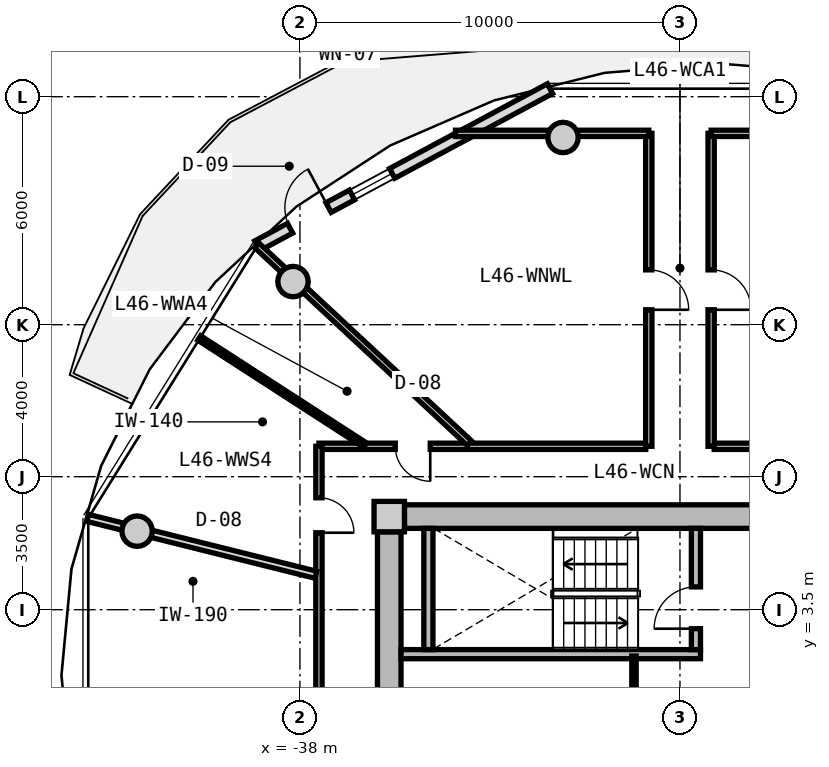
"""IFC4 building model, lengths in metres.
Left out: names, types, materials, properties, quantities, classifications, styles, units other than length and angle.
Written with IfcOpenShell. Run it as: python <this file> out.ifc"""

import sys

from ifc_helpers import new_model, si_unit, direction, frame, frame_2d, origin, origin_2d, place, context, subcontext, project, spatial, rectangle, circle, extrude, source, transform, mapped, element, fill, save


model = new_model("IFC4")
c1 = context("Model", 3, precision=1e-05, world=origin(), true_north=direction((0.0, 1.0)))
c2 = subcontext(c1, "Body", "Model", "MODEL_VIEW")
j1 = project(units=[si_unit("LENGTHUNIT", "METRE"), si_unit("PLANEANGLEUNIT", "RADIAN")], contexts=[c1])
p1 = place(None, origin())
s1 = spatial("IfcSite", under=j1, at=p1, CompositionType="ELEMENT")
p2 = place(p1, origin())
s2 = spatial("IfcBuilding", under=s1, at=p2, CompositionType="ELEMENT")
p3 = place(p2, frame((0.0, 0.0, 149.55)))
s3 = spatial("IfcBuildingStorey", under=s2, at=p3, CompositionType="ELEMENT", Elevation=149.55)
m1 = source(origin(), c2, "Body", "SweptSolid", [
    extrude(rectangle(XDim=0.8, YDim=0.8, at=origin_2d()), origin(), (0.0, 0.0, 1.0), 3.05),
])
p4 = place(p3, frame((-35.65, 5.95, 0.0), z_axis=(0.0, 0.0, 1.0), x_axis=(1.0, 0.0, 0.0)))
e1 = element("IfcColumn", 1, at=p4, inside=s3, PredefinedType="COLUMN", context=c2, shape_type="MappedRepresentation", body=[
    mapped(m1, transform((0.0, 0.0, 0.0), x_axis=(1.0, 0.0, 0.0), y_axis=(0.0, 1.0, 0.0), z_axis=(0.0, 0.0, 1.0), scale=1.0)),
])
m2 = source(origin(), c2, "Body", "SweptSolid", [
    extrude(rectangle(XDim=14.5, YDim=0.62, at=frame_2d((7.25, 0.0))), origin(), (0.0, 0.0, 1.0), 2.81),
])
p5 = place(p3, frame((-35.25, 5.95, 0.0), z_axis=(0.0, 0.0, 1.0), x_axis=(1.0, 0.0, 0.0)))
e2 = element("IfcWall", 2, at=p5, inside=s3, PredefinedType="SHEAR", context=c2, shape_type="MappedRepresentation", body=[
    mapped(m2, transform((0.0, 0.0, 0.0), x_axis=(1.0, 0.0, 0.0), y_axis=(0.0, 1.0, 0.0), z_axis=(0.0, 0.0, 1.0), scale=1.0)),
])
m3 = source(origin(), c2, "Body", "SweptSolid", [
    extrude(rectangle(XDim=11.1, YDim=0.62, at=frame_2d((5.55, 0.0))), origin(), (0.0, 0.0, 1.0), 2.81),
])
p6 = place(p3, frame((-35.65, -5.55, 0.0), z_axis=(0.0, 0.0, 1.0), x_axis=(0.0, 1.0, 0.0)))
e3 = element("IfcWall", 3, at=p6, inside=s3, PredefinedType="SHEAR", context=c2, shape_type="MappedRepresentation", body=[
    mapped(m3, transform((0.0, 0.0, 0.0), x_axis=(1.0, 0.0, 0.0), y_axis=(0.0, 1.0, 0.0), z_axis=(0.0, 0.0, 1.0), scale=1.0)),
])
p7 = place(p6, frame((3.8, 0.0, 0.0)))
e4 = element("IfcOpeningElement", 4, at=p7, cuts=e3, PredefinedType="OPENING", context=c2, shape_type="SweptSolid", body=[
    extrude(rectangle(XDim=1.2, YDim=2.15, at=frame_2d((0.6, 1.075))), frame((0.0, 0.32, 0.0), z_axis=(0.0, -1.0, 0.0), x_axis=(1.0, 0.0, 0.0)), (0.0, 0.0, 1.0), 0.64),
])
m4 = source(origin(), c2, "Body", "SweptSolid", [
    extrude(circle(Radius=0.4, at=origin_2d()), origin(), (0.0, 0.0, 1.0), 3.05),
])
for number, where, z_axis, x_axis in (
    (5, (-31.077, 15.926, 0.0), (0.0, 0.0, 1.0), (1.0, 0.0, 0.0)),
    (6, (-38.183, 12.135, 0.0), (0.0, 0.0, 1.0), (1.0, 0.0, 0.0)),
    (7, (-42.285, 5.567, 0.0), (0.0, 0.0, 1.0), (1.0, 0.0, 0.0)),
):
    element("IfcColumn", number, at=place(p3, frame(where, z_axis=z_axis, x_axis=x_axis)), inside=s3, PredefinedType="COLUMN", context=c2, shape_type="MappedRepresentation", body=[
        mapped(m4, transform((0.0, 0.0, 0.0), x_axis=(1.0, 0.0, 0.0), y_axis=(0.0, 1.0, 0.0), z_axis=(0.0, 0.0, 1.0), scale=1.0)),
    ])
m5 = source(origin(), c2, "Body", "SweptSolid", [
    extrude(rectangle(XDim=8.742, YDim=0.29, at=frame_2d((4.371, 0.0))), origin(), (0.0, 0.0, 1.0), 2.81),
])
p8 = place(p3, frame((-39.123, 13.075, 0.0), z_axis=(0.0, 0.0, 1.0), x_axis=(0.880992489116, 0.473130250693, 0.0)))
e8 = element("IfcWall", 8, at=p8, inside=s3, PredefinedType="SOLIDWALL", context=c2, shape_type="MappedRepresentation", body=[
    mapped(m5, transform((0.0, 0.0, 0.0), x_axis=(1.0, 0.0, 0.0), y_axis=(0.0, 1.0, 0.0), z_axis=(0.0, 0.0, 1.0), scale=1.0)),
])
p9 = place(p8, frame((0.98, 0.0, 0.0)))
e9 = element("IfcOpeningElement", 9, at=p9, cuts=e8, PredefinedType="OPENING", context=c2, shape_type="SweptSolid", body=[
    extrude(rectangle(XDim=1.15, YDim=2.25, at=frame_2d((0.575, 1.125))), frame((0.0, 0.155, 0.0), z_axis=(0.0, -1.0, 0.0), x_axis=(1.0, 0.0, 0.0)), (0.0, 0.0, 1.0), 0.31),
])
p10 = place(p8, frame((2.83, 0.0, 0.85)))
e10 = element("IfcOpeningElement", 10, at=p10, cuts=e8, PredefinedType="OPENING", context=c2, shape_type="SweptSolid", body=[
    extrude(rectangle(XDim=1.2, YDim=1.5, at=frame_2d((0.6, 0.75))), frame((0.0, 0.155, 0.0), z_axis=(0.0, -1.0, 0.0), x_axis=(1.0, 0.0, 0.0)), (0.0, 0.0, 1.0), 0.31),
])
m6 = source(origin(), c2, "Body", "SweptSolid", [
    extrude(rectangle(XDim=7.88, YDim=0.24, at=frame_2d((3.94, 0.0))), origin(), (0.0, 0.0, 1.0), 2.81),
])
p11 = place(p3, frame((-35.34, 2.33, 0.0), z_axis=(0.0, 0.0, 1.0), x_axis=(1.0, 0.0, 0.0)))
e11 = element("IfcWall", 11, at=p11, inside=s3, PredefinedType="PARTITIONING", context=c2, shape_type="MappedRepresentation", body=[
    mapped(m6, transform((0.0, 0.0, 0.0), x_axis=(1.0, 0.0, 0.0), y_axis=(0.0, 1.0, 0.0), z_axis=(0.0, 0.0, 1.0), scale=1.0)),
])
m7 = source(origin(), c2, "Body", "SweptSolid", [
    extrude(rectangle(XDim=3.19, YDim=0.24, at=frame_2d((1.595, 0.0))), origin(), (0.0, 0.0, 1.0), 2.81),
])
p12 = place(p3, frame((-34.62, 2.45, 0.0), z_axis=(0.0, 0.0, 1.0), x_axis=(0.0, 1.0, 0.0)))
e12 = element("IfcWall", 12, at=p12, inside=s3, PredefinedType="PARTITIONING", context=c2, shape_type="MappedRepresentation", body=[
    mapped(m7, transform((0.0, 0.0, 0.0), x_axis=(1.0, 0.0, 0.0), y_axis=(0.0, 1.0, 0.0), z_axis=(0.0, 0.0, 1.0), scale=1.0)),
])
p13 = place(p3, frame((-27.58, 2.45, 0.0), z_axis=(0.0, 0.0, 1.0), x_axis=(0.0, 1.0, 0.0)))
e13 = element("IfcWall", 13, at=p13, inside=s3, PredefinedType="PARTITIONING", context=c2, shape_type="MappedRepresentation", body=[
    mapped(m7, transform((0.0, 0.0, 0.0), x_axis=(1.0, 0.0, 0.0), y_axis=(0.0, 1.0, 0.0), z_axis=(0.0, 0.0, 1.0), scale=1.0)),
])
p14 = place(p13, frame((0.55, 0.0, 0.0)))
e14 = element("IfcOpeningElement", 14, at=p14, cuts=e13, PredefinedType="OPENING", context=c2, shape_type="SweptSolid", body=[
    extrude(rectangle(XDim=1.1, YDim=2.15, at=frame_2d((0.55, 1.075))), frame((0.0, 0.13, 0.0), z_axis=(0.0, -1.0, 0.0), x_axis=(1.0, 0.0, 0.0)), (0.0, 0.0, 1.0), 0.26),
])
m8 = source(origin(), c2, "Body", "SweptSolid", [
    extrude(rectangle(XDim=2.33, YDim=0.115, at=frame_2d((1.165, 0.0))), origin(), (0.0, 0.0, 1.0), 2.795),
])
p15 = place(p3, frame((-29.21, -0.05, 0.0), z_axis=(0.0, 0.0, 1.0), x_axis=(0.0, 1.0, 0.0)))
e15 = element("IfcWall", 15, at=p15, inside=s3, PredefinedType="PARTITIONING", context=c2, shape_type="MappedRepresentation", body=[
    mapped(m8, transform((0.0, 0.0, 0.0), x_axis=(1.0, 0.0, 0.0), y_axis=(0.0, 1.0, 0.0), z_axis=(0.0, 0.0, 1.0), scale=1.0)),
])
m9 = source(origin(), c2, "Body", "SweptSolid", [
    extrude(rectangle(XDim=8.6, YDim=0.165, at=frame_2d((4.3, 0.0))), origin(), (0.0, 0.0, 1.0), 2.795),
])
p16 = place(p3, frame((-37.5, 7.8, 0.0), z_axis=(0.0, 0.0, 1.0), x_axis=(1.0, 0.0, 0.0)))
e16 = element("IfcWall", 16, at=p16, inside=s3, PredefinedType="PARTITIONING", context=c2, shape_type="MappedRepresentation", body=[
    mapped(m9, transform((0.0, 0.0, 0.0), x_axis=(1.0, 0.0, 0.0), y_axis=(0.0, 1.0, 0.0), z_axis=(0.0, 0.0, 1.0), scale=1.0)),
])
p17 = place(p16, frame((2.009, 0.0, 0.0)))
e17 = element("IfcOpeningElement", 17, at=p17, cuts=e16, PredefinedType="OPENING", context=c2, shape_type="SweptSolid", body=[
    extrude(rectangle(XDim=0.92, YDim=2.1, at=frame_2d((0.46, 1.05))), frame((0.0, 0.093, 0.0), z_axis=(0.0, -1.0, 0.0), x_axis=(1.0, 0.0, 0.0)), (0.0, 0.0, 1.0), 0.185),
])
p18 = place(p3, frame((-27.1, 7.8, 0.0), z_axis=(0.0, 0.0, 1.0), x_axis=(1.0, 0.0, 0.0)))
e18 = element("IfcWall", 18, at=p18, inside=s3, PredefinedType="PARTITIONING", context=c2, shape_type="MappedRepresentation", body=[
    mapped(m9, transform((0.0, 0.0, 0.0), x_axis=(1.0, 0.0, 0.0), y_axis=(0.0, 1.0, 0.0), z_axis=(0.0, 0.0, 1.0), scale=1.0)),
])
p19 = place(p18, frame((6.96, 0.0, 0.0)))
e19 = element("IfcOpeningElement", 19, at=p19, cuts=e18, PredefinedType="OPENING", context=c2, shape_type="SweptSolid", body=[
    extrude(rectangle(XDim=1.05, YDim=2.15, at=frame_2d((0.525, 1.075))), frame((0.0, 0.093, 0.0), z_axis=(0.0, -1.0, 0.0), x_axis=(1.0, 0.0, 0.0)), (0.0, 0.0, 1.0), 0.185),
])
p20 = place(p18, frame((3.904, 0.0, 0.0)))
e20 = element("IfcOpeningElement", 20, at=p20, cuts=e18, PredefinedType="OPENING", context=c2, shape_type="SweptSolid", body=[
    extrude(rectangle(XDim=1.05, YDim=2.15, at=frame_2d((0.525, 1.075))), frame((0.0, 0.093, 0.0), z_axis=(0.0, -1.0, 0.0), x_axis=(1.0, 0.0, 0.0)), (0.0, 0.0, 1.0), 0.185),
])
p21 = place(p18, frame((2.347, 0.0, 0.0)))
e21 = element("IfcOpeningElement", 21, at=p21, cuts=e18, PredefinedType="OPENING", context=c2, shape_type="SweptSolid", body=[
    extrude(rectangle(XDim=1.05, YDim=2.15, at=frame_2d((0.525, 1.075))), frame((0.0, 0.093, 0.0), z_axis=(0.0, -1.0, 0.0), x_axis=(1.0, 0.0, 0.0)), (0.0, 0.0, 1.0), 0.185),
])
m10 = source(origin(), c2, "Body", "SweptSolid", [
    extrude(rectangle(XDim=15.6, YDim=0.165, at=frame_2d((7.8, 0.0))), origin(), (0.0, 0.0, 1.0), 2.795),
])
p22 = place(p3, frame((-37.5, -7.8, 0.0), z_axis=(0.0, 0.0, 1.0), x_axis=(0.0, 1.0, 0.0)))
e22 = element("IfcWall", 22, at=p22, inside=s3, PredefinedType="PARTITIONING", context=c2, shape_type="MappedRepresentation", body=[
    mapped(m10, transform((0.0, 0.0, 0.0), x_axis=(1.0, 0.0, 0.0), y_axis=(0.0, 1.0, 0.0), z_axis=(0.0, 0.0, 1.0), scale=1.0)),
])
p23 = place(p22, frame((13.325, 0.0, 0.0)))
e23 = element("IfcOpeningElement", 23, at=p23, cuts=e22, PredefinedType="OPENING", context=c2, shape_type="SweptSolid", body=[
    extrude(rectangle(XDim=0.92, YDim=2.1, at=frame_2d((0.46, 1.05))), frame((0.0, 0.093, 0.0), z_axis=(0.0, -1.0, 0.0), x_axis=(1.0, 0.0, 0.0)), (0.0, 0.0, 1.0), 0.185),
])
p24 = place(p22, frame((5.628, 0.0, 0.0)))
e24 = element("IfcOpeningElement", 24, at=p24, cuts=e22, PredefinedType="OPENING", context=c2, shape_type="SweptSolid", body=[
    extrude(rectangle(XDim=1.25, YDim=2.2, at=frame_2d((0.625, 1.1))), frame((0.0, 0.093, 0.0), z_axis=(0.0, -1.0, 0.0), x_axis=(1.0, 0.0, 0.0)), (0.0, 0.0, 1.0), 0.185),
])
m11 = source(origin(), c2, "Body", "SweptSolid", [
    extrude(rectangle(XDim=7.648, YDim=0.165, at=frame_2d((3.824, 0.0))), origin(), (0.0, 0.0, 1.0), 2.345),
])
p25 = place(p3, frame((-33.538, 7.88, 0.0), z_axis=(0.0, 0.0, 1.0), x_axis=(-0.732167856666, 0.681124239522, 0.0)))
e25 = element("IfcWall", 25, at=p25, inside=s3, PredefinedType="PARTITIONING", context=c2, shape_type="MappedRepresentation", body=[
    mapped(m11, transform((0.0, 0.0, 0.0), x_axis=(1.0, 0.0, 0.0), y_axis=(0.0, 1.0, 0.0), z_axis=(0.0, 0.0, 1.0), scale=1.0)),
])
m12 = source(origin(), c2, "Body", "SweptSolid", [
    extrude(rectangle(XDim=8.235, YDim=0.165, at=frame_2d((4.118, 0.0))), origin(), (0.0, 0.0, 1.0), 2.795),
])
p26 = place(p3, frame((-28.82, 7.8, 0.0), z_axis=(0.0, 0.0, 1.0), x_axis=(0.0, 1.0, 0.0)))
e26 = element("IfcWall", 26, at=p26, inside=s3, PredefinedType="PARTITIONING", context=c2, shape_type="MappedRepresentation", body=[
    mapped(m12, transform((0.0, 0.0, 0.0), x_axis=(1.0, 0.0, 0.0), y_axis=(0.0, 1.0, 0.0), z_axis=(0.0, 0.0, 1.0), scale=1.0)),
])
p27 = place(p26, frame((3.593, 0.0, 0.0)))
e27 = element("IfcOpeningElement", 27, at=p27, cuts=e26, PredefinedType="OPENING", context=c2, shape_type="SweptSolid", body=[
    extrude(rectangle(XDim=1.05, YDim=2.15, at=frame_2d((0.525, 1.075))), frame((0.0, 0.093, 0.0), z_axis=(0.0, -1.0, 0.0), x_axis=(1.0, 0.0, 0.0)), (0.0, 0.0, 1.0), 0.185),
])
m13 = source(origin(), c2, "Body", "SweptSolid", [
    extrude(rectangle(XDim=5.089, YDim=0.165, at=frame_2d((2.544, 0.0))), origin(), (0.0, 0.0, 1.0), 2.345),
])
p28 = place(p3, frame((-33.909, 16.035, 0.0), z_axis=(0.0, 0.0, 1.0), x_axis=(1.0, 0.0, 0.0)))
e28 = element("IfcWall", 28, at=p28, inside=s3, PredefinedType="PARTITIONING", context=c2, shape_type="MappedRepresentation", body=[
    mapped(m13, transform((0.0, 0.0, 0.0), x_axis=(1.0, 0.0, 0.0), y_axis=(0.0, 1.0, 0.0), z_axis=(0.0, 0.0, 1.0), scale=1.0)),
])
p29 = place(p3, frame((-27.18, 7.8, 0.0), z_axis=(0.0, 0.0, 1.0), x_axis=(0.0, 1.0, 0.0)))
e29 = element("IfcWall", 29, at=p29, inside=s3, PredefinedType="PARTITIONING", context=c2, shape_type="MappedRepresentation", body=[
    mapped(m12, transform((0.0, 0.0, 0.0), x_axis=(1.0, 0.0, 0.0), y_axis=(0.0, 1.0, 0.0), z_axis=(0.0, 0.0, 1.0), scale=1.0)),
])
p30 = place(p29, frame((3.593, 0.0, 0.0)))
e30 = element("IfcOpeningElement", 30, at=p30, cuts=e29, PredefinedType="OPENING", context=c2, shape_type="SweptSolid", body=[
    extrude(rectangle(XDim=1.05, YDim=2.15, at=frame_2d((0.525, 1.075))), frame((0.0, 0.093, 0.0), z_axis=(0.0, -1.0, 0.0), x_axis=(1.0, 0.0, 0.0)), (0.0, 0.0, 1.0), 0.185),
])
m14 = source(origin(), c2, "Body", "SweptSolid", [
    extrude(rectangle(XDim=4.469, YDim=0.165, at=frame_2d((2.234, 0.0))), origin(), (0.0, 0.0, 1.0), 2.345),
])
p31 = place(p3, frame((-27.18, 16.035, 0.0), z_axis=(0.0, 0.0, 1.0), x_axis=(1.0, 0.0, 0.0)))
e31 = element("IfcWall", 31, at=p31, inside=s3, PredefinedType="PARTITIONING", context=c2, shape_type="MappedRepresentation", body=[
    mapped(m14, transform((0.0, 0.0, 0.0), x_axis=(1.0, 0.0, 0.0), y_axis=(0.0, 1.0, 0.0), z_axis=(0.0, 0.0, 1.0), scale=1.0)),
])
m15 = source(origin(), c2, "Body", "SweptSolid", [
    extrude(rectangle(XDim=6.193, YDim=0.19, at=frame_2d((3.096, 0.0))), origin(), (0.0, 0.0, 1.0), 2.345),
])
p32 = place(p3, frame((-37.58, 4.419, 0.0), z_axis=(0.0, 0.0, 1.0), x_axis=(-0.970309243466, 0.241867674657, 0.0)))
e32 = element("IfcWall", 32, at=p32, inside=s3, PredefinedType="PARTITIONING", context=c2, shape_type="MappedRepresentation", body=[
    mapped(m15, transform((0.0, 0.0, 0.0), x_axis=(1.0, 0.0, 0.0), y_axis=(0.0, 1.0, 0.0), z_axis=(0.0, 0.0, 1.0), scale=1.0)),
])
m16 = source(origin(), c2, "Body", "SweptSolid", [
    extrude(rectangle(XDim=5.197, YDim=0.14, at=frame_2d((2.598, 0.0))), origin(), (0.0, 0.0, 1.0), 2.795),
])
p33 = place(p3, frame((-36.286, 7.83, 0.0), z_axis=(0.0, 0.0, 1.0), x_axis=(-0.839929187515, 0.542696010637, 0.0)))
e33 = element("IfcWall", 33, at=p33, inside=s3, PredefinedType="PARTITIONING", context=c2, shape_type="MappedRepresentation", body=[
    mapped(m16, transform((0.0, 0.0, 0.0), x_axis=(1.0, 0.0, 0.0), y_axis=(0.0, 1.0, 0.0), z_axis=(0.0, 0.0, 1.0), scale=1.0)),
])
m17 = source(origin(), c2, "Body", "SweptSolid", [
    extrude(rectangle(XDim=1.15, YDim=2.25, at=frame_2d((0.575, 1.125))), frame((0.0, 0.025, 0.0), z_axis=(0.0, -1.0, 0.0), x_axis=(1.0, 0.0, 0.0)), (0.0, 0.0, 1.0), 0.05),
])
p34 = place(p9, origin())
e34 = element("IfcDoor", 34, at=p34, inside=s3, OperationType="SINGLE_SWING_RIGHT", PredefinedType="DOOR", context=c2, shape_type="MappedRepresentation", body=[
    mapped(m17, transform((0.0, 0.0, 0.0), x_axis=(1.0, 0.0, 0.0), y_axis=(0.0, 1.0, 0.0), z_axis=(0.0, 0.0, 1.0), scale=1.0)),
])
fill(e9, e34)
m18 = source(origin(), c2, "Body", "SweptSolid", [
    extrude(rectangle(XDim=1.2, YDim=1.5, at=frame_2d((0.6, 0.75))), frame((0.0, 0.03, 0.0), z_axis=(0.0, -1.0, 0.0), x_axis=(1.0, 0.0, 0.0)), (0.0, 0.0, 1.0), 0.06),
])
p35 = place(p10, origin())
e35 = element("IfcWindow", 35, at=p35, inside=s3, PartitioningType="SINGLE_PANEL", PredefinedType="WINDOW", context=c2, shape_type="MappedRepresentation", body=[
    mapped(m18, transform((0.0, 0.0, 0.0), x_axis=(1.0, 0.0, 0.0), y_axis=(0.0, 1.0, 0.0), z_axis=(0.0, 0.0, 1.0), scale=1.0)),
])
fill(e10, e35)
m19 = source(origin(), c2, "Body", "SweptSolid", [
    extrude(rectangle(XDim=1.1, YDim=2.15, at=frame_2d((0.55, 1.075))), frame((0.0, 0.025, 0.0), z_axis=(0.0, -1.0, 0.0), x_axis=(1.0, 0.0, 0.0)), (0.0, 0.0, 1.0), 0.05),
])
p36 = place(p14, origin())
e36 = element("IfcDoor", 36, at=p36, inside=s3, OperationType="SINGLE_SWING_LEFT", PredefinedType="DOOR", context=c2, shape_type="MappedRepresentation", body=[
    mapped(m19, transform((0.0, 0.0, 0.0), x_axis=(1.0, 0.0, 0.0), y_axis=(0.0, 1.0, 0.0), z_axis=(0.0, 0.0, 1.0), scale=1.0)),
])
fill(e14, e36)
m20 = source(origin(), c2, "Body", "SweptSolid", [
    extrude(rectangle(XDim=1.05, YDim=2.15, at=frame_2d((0.525, 1.075))), frame((0.0, 0.025, 0.0), z_axis=(0.0, -1.0, 0.0), x_axis=(1.0, 0.0, 0.0)), (0.0, 0.0, 1.0), 0.05),
])
p37 = place(p27, frame((1.05, 0.0, 0.0), z_axis=(0.0, 0.0, 1.0), x_axis=(-1.0, 0.0, 0.0)))
e37 = element("IfcDoor", 37, at=p37, inside=s3, OperationType="SINGLE_SWING_RIGHT", PredefinedType="DOOR", context=c2, shape_type="MappedRepresentation", body=[
    mapped(m20, transform((0.0, 0.0, 0.0), x_axis=(1.0, 0.0, 0.0), y_axis=(0.0, 1.0, 0.0), z_axis=(0.0, 0.0, 1.0), scale=1.0)),
])
fill(e27, e37)
p38 = place(p30, frame((1.05, 0.0, 0.0), z_axis=(0.0, 0.0, 1.0), x_axis=(-1.0, 0.0, 0.0)))
e38 = element("IfcDoor", 38, at=p38, inside=s3, OperationType="SINGLE_SWING_RIGHT", PredefinedType="DOOR", context=c2, shape_type="MappedRepresentation", body=[
    mapped(m20, transform((0.0, 0.0, 0.0), x_axis=(1.0, 0.0, 0.0), y_axis=(0.0, 1.0, 0.0), z_axis=(0.0, 0.0, 1.0), scale=1.0)),
])
fill(e30, e38)
m21 = source(origin(), c2, "Body", "SweptSolid", [
    extrude(rectangle(XDim=0.92, YDim=2.1, at=frame_2d((0.46, 1.05))), frame((0.0, 0.025, 0.0), z_axis=(0.0, -1.0, 0.0), x_axis=(1.0, 0.0, 0.0)), (0.0, 0.0, 1.0), 0.05),
])
p39 = place(p17, frame((0.92, 0.0, 0.0), z_axis=(0.0, 0.0, 1.0), x_axis=(-1.0, 0.0, 0.0)))
e39 = element("IfcDoor", 39, at=p39, inside=s3, OperationType="SINGLE_SWING_LEFT", PredefinedType="DOOR", context=c2, shape_type="MappedRepresentation", body=[
    mapped(m21, transform((0.0, 0.0, 0.0), x_axis=(1.0, 0.0, 0.0), y_axis=(0.0, 1.0, 0.0), z_axis=(0.0, 0.0, 1.0), scale=1.0)),
])
fill(e17, e39)
p40 = place(p23, frame((0.92, 0.0, 0.0), z_axis=(0.0, 0.0, 1.0), x_axis=(-1.0, 0.0, 0.0)))
e40 = element("IfcDoor", 40, at=p40, inside=s3, OperationType="SINGLE_SWING_RIGHT", PredefinedType="DOOR", context=c2, shape_type="MappedRepresentation", body=[
    mapped(m21, transform((0.0, 0.0, 0.0), x_axis=(1.0, 0.0, 0.0), y_axis=(0.0, 1.0, 0.0), z_axis=(0.0, 0.0, 1.0), scale=1.0)),
])
fill(e23, e40)
save(model, sys.argv[1])
